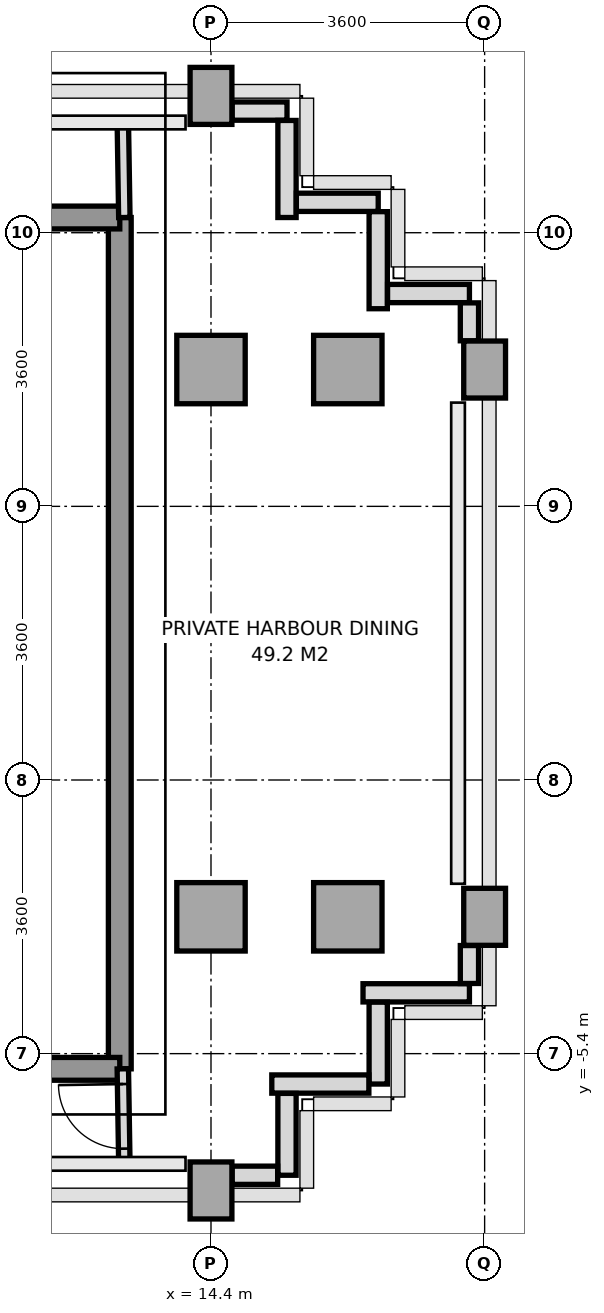
"""IFC4 building model, lengths in metres.
Left out: names, types, materials, properties, quantities, classifications, styles, units other than length and angle.
Written with IfcOpenShell. Run it as: python <this file> out.ifc"""

import sys

from ifc_helpers import new_model, si_unit, direction, frame, frame_2d, origin, origin_2d, place, context, subcontext, project, spatial, rectangle, extrude, source, transform, mapped, element, fill, save


model = new_model("IFC4")
c1 = context("Model", 3, precision=1e-05, world=origin(), true_north=direction((0.0, 1.0)))
c2 = subcontext(c1, "Body", "Model", "MODEL_VIEW")
j1 = project(units=[si_unit("LENGTHUNIT", "METRE"), si_unit("PLANEANGLEUNIT", "RADIAN")], contexts=[c1])
p1 = place(None, origin())
s1 = spatial("IfcSite", under=j1, at=p1, CompositionType="ELEMENT")
p2 = place(p1, origin())
s2 = spatial("IfcBuilding", under=s1, at=p2, CompositionType="ELEMENT")
p3 = place(p2, frame((0.0, 0.0, 249.2)))
s3 = spatial("IfcBuildingStorey", under=s2, at=p3, CompositionType="ELEMENT", Elevation=249.2)
m1 = source(origin(), c2, "Body", "SweptSolid", [
    extrude(rectangle(XDim=0.55, YDim=0.75, at=origin_2d()), origin(), (0.0, 0.0, 1.0), 3.01),
])
p4 = place(p3, frame((14.4, -7.2, 0.0), z_axis=(0.0, 0.0, 1.0), x_axis=(1.0, 0.0, 0.0)))
e1 = element("IfcColumn", 1, at=p4, inside=s3, PredefinedType="COLUMN", context=c2, shape_type="MappedRepresentation", body=[
    mapped(m1, transform((0.0, 0.0, 0.0), x_axis=(1.0, 0.0, 0.0), y_axis=(0.0, 1.0, 0.0), z_axis=(0.0, 0.0, 1.0), scale=1.0)),
])
m2 = source(origin(), c2, "Body", "SweptSolid", [
    extrude(rectangle(XDim=0.9, YDim=0.9, at=origin_2d()), origin(), (0.0, 0.0, 1.0), 3.01),
])
for number, where, z_axis, x_axis in (
    (2, (14.4, -3.6, 0.0), (0.0, 0.0, 1.0), (1.0, 0.0, 0.0)),
    (3, (14.4, 3.6, 0.0), (0.0, 0.0, 1.0), (1.0, 0.0, 0.0)),
):
    element("IfcColumn", number, at=place(p3, frame(where, z_axis=z_axis, x_axis=x_axis)), inside=s3, PredefinedType="COLUMN", context=c2, shape_type="MappedRepresentation", body=[
        mapped(m2, transform((0.0, 0.0, 0.0), x_axis=(1.0, 0.0, 0.0), y_axis=(0.0, 1.0, 0.0), z_axis=(0.0, 0.0, 1.0), scale=1.0)),
    ])
p5 = place(p3, frame((14.4, 7.2, 0.0), z_axis=(0.0, 0.0, 1.0), x_axis=(1.0, 0.0, 0.0)))
e4 = element("IfcColumn", 4, at=p5, inside=s3, PredefinedType="COLUMN", context=c2, shape_type="MappedRepresentation", body=[
    mapped(m1, transform((0.0, 0.0, 0.0), x_axis=(1.0, 0.0, 0.0), y_axis=(0.0, 1.0, 0.0), z_axis=(0.0, 0.0, 1.0), scale=1.0)),
])
for number, where, z_axis, x_axis in (
    (5, (16.2, -3.6, 0.0), (0.0, 0.0, 1.0), (1.0, 0.0, 0.0)),
    (6, (16.2, 3.6, 0.0), (0.0, 0.0, 1.0), (1.0, 0.0, 0.0)),
):
    element("IfcColumn", number, at=place(p3, frame(where, z_axis=z_axis, x_axis=x_axis)), inside=s3, PredefinedType="COLUMN", context=c2, shape_type="MappedRepresentation", body=[
        mapped(m2, transform((0.0, 0.0, 0.0), x_axis=(1.0, 0.0, 0.0), y_axis=(0.0, 1.0, 0.0), z_axis=(0.0, 0.0, 1.0), scale=1.0)),
    ])
for number, where, z_axis, x_axis in (
    (7, (18.0, -3.6, 0.0), (0.0, 0.0, 1.0), (1.0, 0.0, 0.0)),
    (8, (18.0, 3.6, 0.0), (0.0, 0.0, 1.0), (1.0, 0.0, 0.0)),
):
    element("IfcColumn", number, at=place(p3, frame(where, z_axis=z_axis, x_axis=x_axis)), inside=s3, PredefinedType="COLUMN", context=c2, shape_type="MappedRepresentation", body=[
        mapped(m1, transform((0.0, 0.0, 0.0), x_axis=(1.0, 0.0, 0.0), y_axis=(0.0, 1.0, 0.0), z_axis=(0.0, 0.0, 1.0), scale=1.0)),
    ])
p6 = place(p3, frame((17.8, -4.6, 0.0), z_axis=(0.0, 0.0, 1.0), x_axis=(-1.0, 0.0, 0.0)))
e9 = element("IfcWall", 9, at=p6, inside=s3, PredefinedType="PARAPET", context=c2, shape_type="SweptSolid", body=[
    extrude(rectangle(XDim=1.4, YDim=0.24, at=frame_2d((0.7, 0.0))), origin(), (0.0, 0.0, 1.0), 1.15),
])
p7 = place(p3, frame((16.6, -4.723, 0.0), z_axis=(0.0, 0.0, 1.0), x_axis=(0.0, -1.0, 0.0)))
e10 = element("IfcWall", 10, at=p7, inside=s3, PredefinedType="PARAPET", context=c2, shape_type="SweptSolid", body=[
    extrude(rectangle(XDim=1.077, YDim=0.24, at=frame_2d((0.539, 0.0))), origin(), (0.0, 0.0, 1.0), 1.15),
])
p8 = place(p3, frame((16.477, -5.8, 0.0), z_axis=(0.0, 0.0, 1.0), x_axis=(-1.0, 0.0, 0.0)))
e11 = element("IfcWall", 11, at=p8, inside=s3, PredefinedType="PARAPET", context=c2, shape_type="SweptSolid", body=[
    extrude(rectangle(XDim=1.277, YDim=0.24, at=frame_2d((0.639, 0.0))), origin(), (0.0, 0.0, 1.0), 1.15),
])
p9 = place(p3, frame((15.4, -5.923, 0.0), z_axis=(0.0, 0.0, 1.0), x_axis=(0.0, -1.0, 0.0)))
e12 = element("IfcWall", 12, at=p9, inside=s3, PredefinedType="PARAPET", context=c2, shape_type="SweptSolid", body=[
    extrude(rectangle(XDim=1.077, YDim=0.24, at=frame_2d((0.539, 0.0))), origin(), (0.0, 0.0, 1.0), 1.15),
])
p10 = place(p3, frame((15.277, -7.0, 0.0), z_axis=(0.0, 0.0, 1.0), x_axis=(-1.0, 0.0, 0.0)))
e13 = element("IfcWall", 13, at=p10, inside=s3, PredefinedType="PARAPET", context=c2, shape_type="SweptSolid", body=[
    extrude(rectangle(XDim=0.599, YDim=0.24, at=frame_2d((0.3, 0.0))), origin(), (0.0, 0.0, 1.0), 1.15),
])
p11 = place(p3, frame((14.678, 7.0, 0.0), z_axis=(0.0, 0.0, 1.0), x_axis=(1.0, 0.0, 0.0)))
e14 = element("IfcWall", 14, at=p11, inside=s3, PredefinedType="PARAPET", context=c2, shape_type="SweptSolid", body=[
    extrude(rectangle(XDim=0.722, YDim=0.24, at=frame_2d((0.361, 0.0))), origin(), (0.0, 0.0, 1.0), 1.15),
])
p12 = place(p3, frame((15.4, 6.877, 0.0), z_axis=(0.0, 0.0, 1.0), x_axis=(0.0, -1.0, 0.0)))
e15 = element("IfcWall", 15, at=p12, inside=s3, PredefinedType="PARAPET", context=c2, shape_type="SweptSolid", body=[
    extrude(rectangle(XDim=1.277, YDim=0.24, at=frame_2d((0.638, 0.0))), origin(), (0.0, 0.0, 1.0), 1.15),
])
p13 = place(p3, frame((15.523, 5.8, 0.0), z_axis=(0.0, 0.0, 1.0), x_axis=(1.0, 0.0, 0.0)))
e16 = element("IfcWall", 16, at=p13, inside=s3, PredefinedType="PARAPET", context=c2, shape_type="SweptSolid", body=[
    extrude(rectangle(XDim=1.077, YDim=0.24, at=frame_2d((0.539, 0.0))), origin(), (0.0, 0.0, 1.0), 1.15),
])
p14 = place(p3, frame((16.6, 5.677, 0.0), z_axis=(0.0, 0.0, 1.0), x_axis=(0.0, -1.0, 0.0)))
e17 = element("IfcWall", 17, at=p14, inside=s3, PredefinedType="PARAPET", context=c2, shape_type="SweptSolid", body=[
    extrude(rectangle(XDim=1.277, YDim=0.24, at=frame_2d((0.639, 0.0))), origin(), (0.0, 0.0, 1.0), 1.15),
])
p15 = place(p3, frame((16.723, 4.6, 0.0), z_axis=(0.0, 0.0, 1.0), x_axis=(1.0, 0.0, 0.0)))
e18 = element("IfcWall", 18, at=p15, inside=s3, PredefinedType="PARAPET", context=c2, shape_type="SweptSolid", body=[
    extrude(rectangle(XDim=1.077, YDim=0.24, at=frame_2d((0.539, 0.0))), origin(), (0.0, 0.0, 1.0), 1.15),
])
for number, where, z_axis, x_axis in (
    (19, (17.8, 4.477, 0.0), (0.0, 0.0, 1.0), (0.0, -1.0, 0.0)),
    (20, (17.8, -3.978, 0.0), (0.0, 0.0, 1.0), (0.0, -1.0, 0.0)),
):
    element("IfcWall", number, at=place(p3, frame(where, z_axis=z_axis, x_axis=x_axis)), inside=s3, PredefinedType="PARAPET", context=c2, shape_type="SweptSolid", body=[
        extrude(rectangle(XDim=0.499, YDim=0.24, at=frame_2d((0.25, 0.0))), origin(), (0.0, 0.0, 1.0), 1.15),
    ])
p16 = place(p3, frame((13.2, -5.6, 0.0), z_axis=(0.0, 0.0, 1.0), x_axis=(0.0, 1.0, 0.0)))
e21 = element("IfcWall", 21, at=p16, inside=s3, PredefinedType="SHEAR", context=c2, shape_type="SweptSolid", body=[
    extrude(rectangle(XDim=11.2, YDim=0.3, at=frame_2d((5.6, 0.0))), origin(), (0.0, 0.0, 1.0), 3.01),
])
p17 = place(p3, frame((11.356, 5.6, 0.0), z_axis=(0.0, 0.0, 1.0), x_axis=(1.0, 0.0, 0.0)))
e22 = element("IfcWall", 22, at=p17, inside=s3, PredefinedType="SHEAR", context=c2, shape_type="SweptSolid", body=[
    extrude(rectangle(XDim=1.844, YDim=0.3, at=frame_2d((0.922, 0.0))), origin(), (0.0, 0.0, 1.0), 3.01),
])
p18 = place(p3, frame((5.4, -5.6, 0.0), z_axis=(0.0, 0.0, 1.0), x_axis=(1.0, 0.0, 0.0)))
e23 = element("IfcWall", 23, at=p18, inside=s3, PredefinedType="SHEAR", context=c2, shape_type="SweptSolid", body=[
    extrude(rectangle(XDim=7.8, YDim=0.3, at=frame_2d((3.9, 0.0))), origin(), (0.0, 0.0, 1.0), 3.01),
])
p19 = place(p3, frame((13.26, 5.6, 0.0), z_axis=(0.0, 0.0, 1.0), x_axis=(-0.016013571389, 0.999871774545, 0.0)))
e24 = element("IfcWall", 24, at=p19, inside=s3, PredefinedType="PARTITIONING", context=c2, shape_type="SweptSolid", body=[
    extrude(rectangle(XDim=1.25, YDim=0.15, at=frame_2d((0.625, 0.0))), origin(), (0.0, 0.0, 1.0), 3.01),
])
p20 = place(p3, frame((13.26, -6.85, 0.0), z_axis=(0.0, 0.0, 1.0), x_axis=(-0.016013571389, 0.999871774545, 0.0)))
e25 = element("IfcWall", 25, at=p20, inside=s3, PredefinedType="PARTITIONING", context=c2, shape_type="SweptSolid", body=[
    extrude(rectangle(XDim=1.25, YDim=0.15, at=frame_2d((0.625, 0.0))), origin(), (0.0, 0.0, 1.0), 3.01),
])
p21 = place(p20, frame((0.2, 0.0, 0.0)))
e26 = element("IfcOpeningElement", 26, at=p21, cuts=e25, PredefinedType="OPENING", context=c2, shape_type="SweptSolid", body=[
    extrude(rectangle(XDim=0.85, YDim=2.1, at=frame_2d((0.425, 1.05))), frame((0.0, 0.085, 0.0), z_axis=(0.0, -1.0, 0.0), x_axis=(1.0, 0.0, 0.0)), (0.0, 0.0, 1.0), 0.17),
])
m3 = source(origin(), c2, "Body", "SweptSolid", [
    extrude(rectangle(XDim=0.85, YDim=2.1, at=frame_2d((0.425, 1.05))), frame((0.0, 0.025, 0.0), z_axis=(0.0, -1.0, 0.0), x_axis=(1.0, 0.0, 0.0)), (0.0, 0.0, 1.0), 0.05),
])
p22 = place(p21, origin())
e27 = element("IfcDoor", 27, at=p22, inside=s3, OperationType="SINGLE_SWING_RIGHT", PredefinedType="DOOR", context=c2, shape_type="MappedRepresentation", body=[
    mapped(m3, transform((0.0, 0.0, 0.0), x_axis=(1.0, 0.0, 0.0), y_axis=(0.0, 1.0, 0.0), z_axis=(0.0, 0.0, 1.0), scale=1.0)),
])
fill(e26, e27)
save(model, sys.argv[1])
